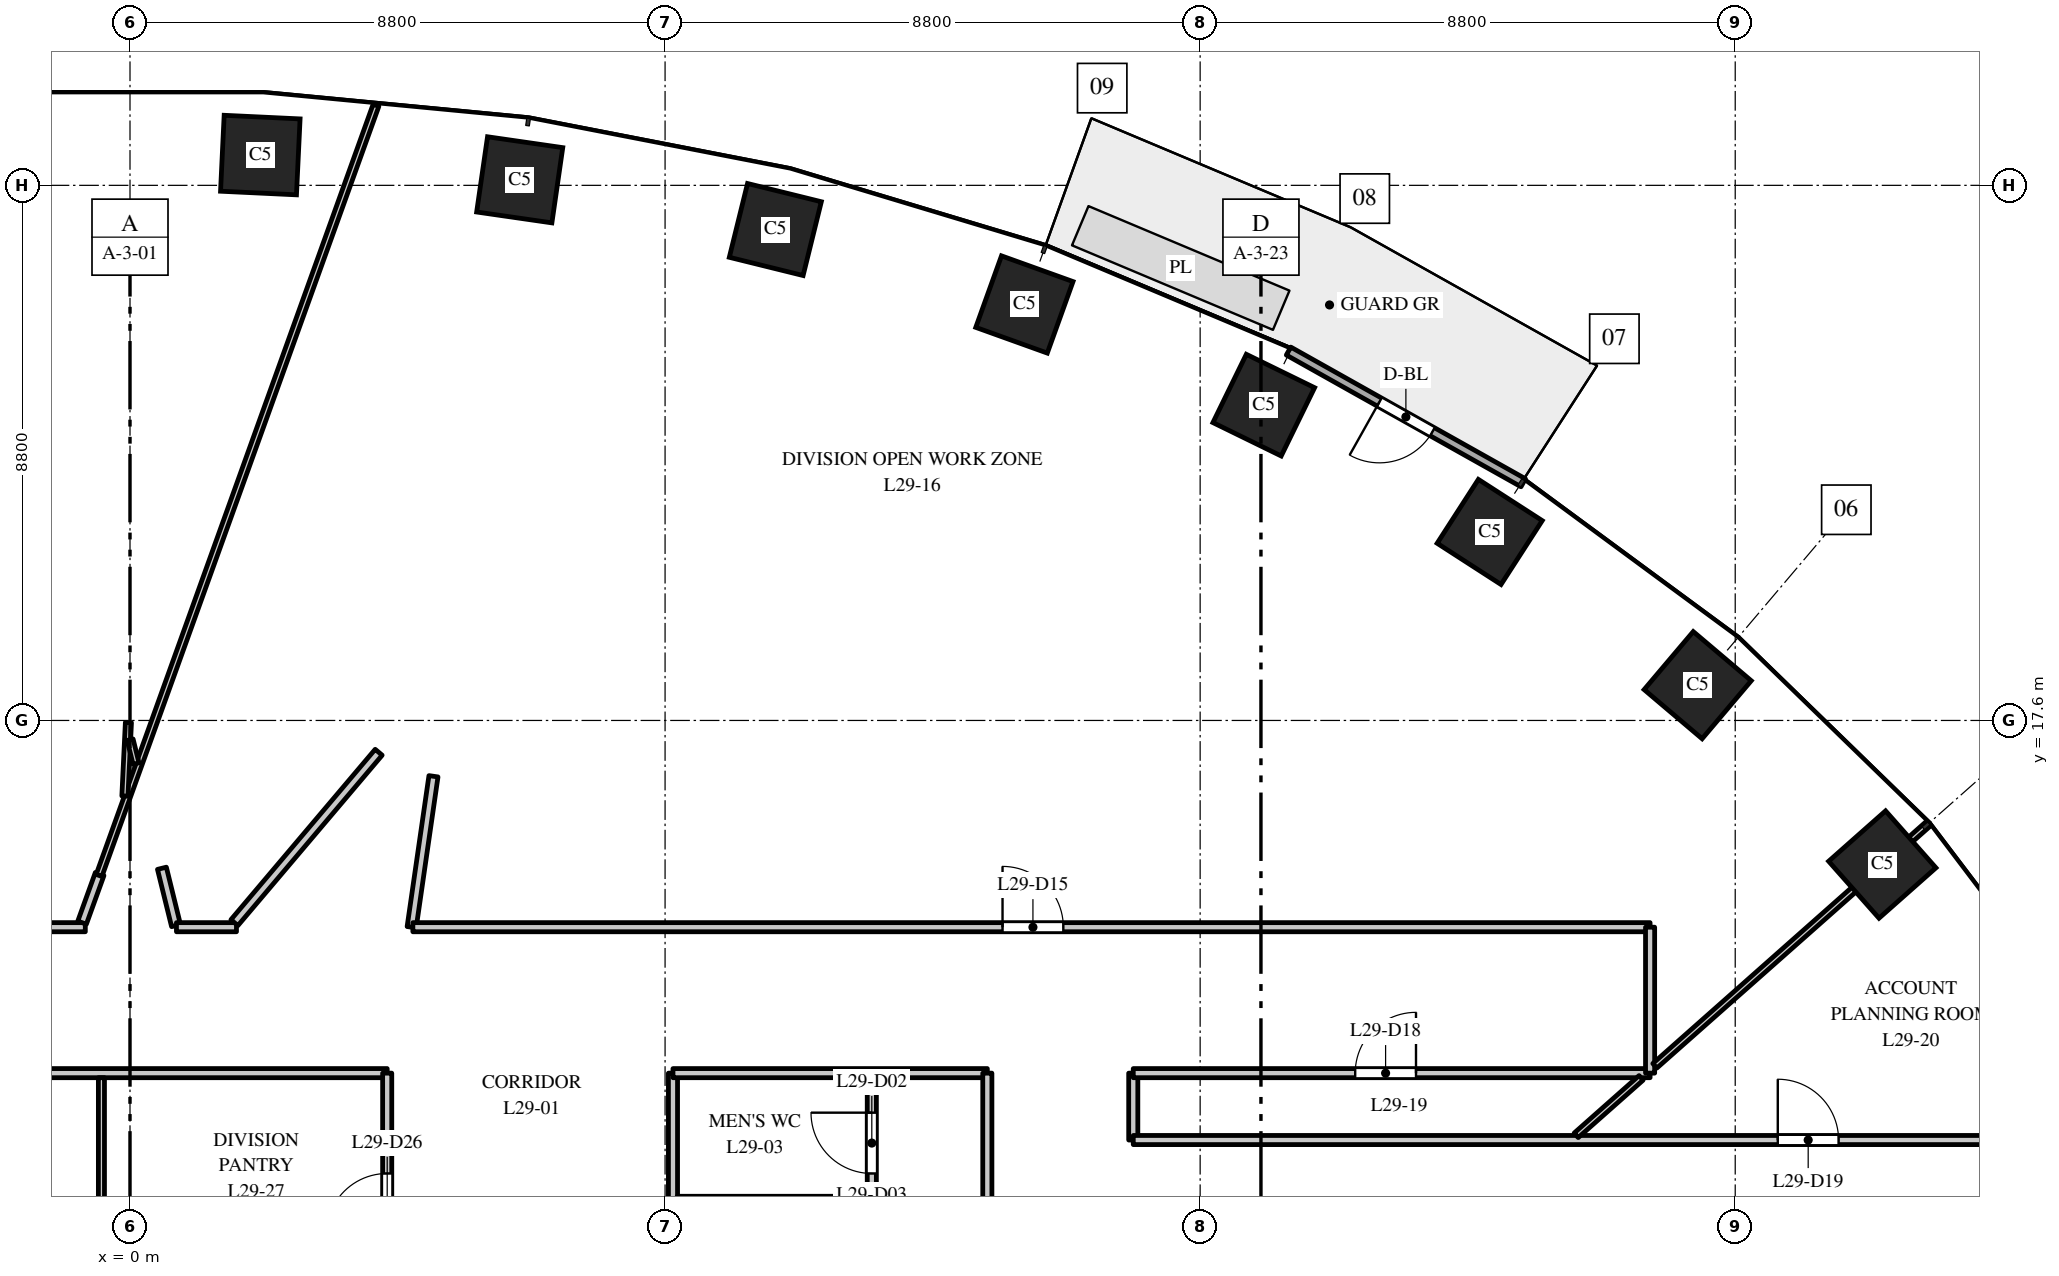
"""IFC4 building model, lengths in metres.
Left out: names, types, materials, properties, quantities, classifications, styles, units other than length and angle.
Written with IfcOpenShell. Run it as: python <this file> out.ifc"""

import sys

from ifc_helpers import new_model, si_unit, direction, frame, frame_2d, origin, origin_2d, place, context, subcontext, project, spatial, rectangle, extrude, element, fill, save


model = new_model("IFC4")
c1 = context("Model", 3, precision=1e-05, world=origin(), true_north=direction((0.0, 1.0)))
c2 = subcontext(c1, "Body", "Model", "MODEL_VIEW")
j1 = project(units=[si_unit("LENGTHUNIT", "METRE"), si_unit("PLANEANGLEUNIT", "RADIAN")], contexts=[c1])
p1 = place(None, origin())
s1 = spatial("IfcSite", under=j1, at=p1, CompositionType="ELEMENT")
p2 = place(p1, origin())
s2 = spatial("IfcBuilding", under=s1, at=p2, CompositionType="ELEMENT")
p3 = place(p2, frame((0.0, 0.0, 128.0)))
s3 = spatial("IfcBuildingStorey", under=s2, at=p3, CompositionType="ELEMENT", Elevation=128.0)
for number, where, z_axis, x_axis in (
    (1, (28.819, 15.23, 0.0), (0.0, 0.0, 1.0), (-0.663, 0.749, 0.0)),
    (2, (25.783, 18.18, 0.0), (0.0, 0.0, 1.0), (-0.763, 0.646, 0.0)),
    (3, (22.362, 20.7, 0.0), (0.0, 0.0, 1.0), (-0.84, 0.542, 0.0)),
    (4, (18.646, 22.785, 0.0), (0.0, 0.0, 1.0), (-0.898, 0.439, 0.0)),
    (5, (14.709, 24.441, 0.0), (0.0, 0.0, 1.0), (-0.941, 0.338, 0.0)),
    (6, (10.613, 25.674, 0.0), (0.0, 0.0, 1.0), (-0.971, 0.24, 0.0)),
    (7, (6.409, 26.491, 0.0), (0.0, 0.0, 1.0), (-0.99, 0.143, 0.0)),
    (8, (2.143, 26.898, 0.0), (0.0, 0.0, 1.0), (-0.999, 0.048, 0.0)),
):
    element("IfcColumn", number, at=place(p3, frame(where, z_axis=z_axis, x_axis=x_axis)), inside=s3, PredefinedType="COLUMN", context=c2, shape_type="SweptSolid", body=[
        extrude(rectangle(XDim=1.25, YDim=1.25, at=origin_2d()), origin(), (0.0, 0.0, 1.0), 4.0),
    ])
p4 = place(p3, frame((22.913, 21.509, 0.0), z_axis=(0.0, 0.0, 1.0), x_axis=(-0.872046572975, 0.489422899509, 0.0)))
e9 = element("IfcWall", 9, at=p4, inside=s3, PredefinedType="STANDARD", context=c2, shape_type="SweptSolid", body=[
    extrude(rectangle(XDim=4.426, YDim=0.15, at=frame_2d((2.213, 0.0))), origin(), (0.0, 0.0, 1.0), 3.7),
])
p5 = place(p4, frame((1.713, 0.0, 0.0)))
e10 = element("IfcOpeningElement", 10, at=p5, cuts=e9, PredefinedType="OPENING", context=c2, shape_type="SweptSolid", body=[
    extrude(rectangle(XDim=1.0, YDim=2.4, at=frame_2d((0.5, 1.2))), frame((0.0, 0.085, 0.0), z_axis=(0.0, -1.0, 0.0), x_axis=(1.0, 0.0, 0.0)), (0.0, 0.0, 1.0), 0.17),
])
p6 = place(p3, frame((-14.1, 11.8, 0.0), z_axis=(0.0, 0.0, 1.0), x_axis=(1.0, 0.0, 0.0)))
e11 = element("IfcWall", 11, at=p6, inside=s3, PredefinedType="PARTITIONING", context=c2, shape_type="SweptSolid", body=[
    extrude(rectangle(XDim=18.33, YDim=0.15, at=frame_2d((9.165, 0.0))), origin(), (0.0, 0.0, 1.0), 2.85),
])
p7 = place(p6, frame((10.83, 0.0, 0.0)))
e12 = element("IfcOpeningElement", 12, at=p7, cuts=e11, PredefinedType="OPENING", context=c2, shape_type="SweptSolid", body=[
    extrude(rectangle(XDim=1.0, YDim=2.1, at=frame_2d((0.5, 1.05))), frame((0.0, 0.085, 0.0), z_axis=(0.0, -1.0, 0.0), x_axis=(1.0, 0.0, 0.0)), (0.0, 0.0, 1.0), 0.17),
])
p8 = place(p3, frame((-4.632, 14.2, 0.0), z_axis=(0.0, 0.0, 1.0), x_axis=(1.0, 0.0, 0.0)))
e13 = element("IfcWall", 13, at=p8, inside=s3, PredefinedType="PARTITIONING", context=c2, shape_type="SweptSolid", body=[
    extrude(rectangle(XDim=3.897, YDim=0.15, at=frame_2d((1.948, 0.0))), origin(), (0.0, 0.0, 1.0), 2.85),
])
p9 = place(p8, frame((1.417, 0.0, 0.0)))
e14 = element("IfcOpeningElement", 14, at=p9, cuts=e13, PredefinedType="OPENING", context=c2, shape_type="SweptSolid", body=[
    extrude(rectangle(XDim=1.0, YDim=2.1, at=frame_2d((0.5, 1.05))), frame((0.0, 0.085, 0.0), z_axis=(0.0, -1.0, 0.0), x_axis=(1.0, 0.0, 0.0)), (0.0, 0.0, 1.0), 0.17),
])
p10 = place(p3, frame((-0.788, 14.275, 0.0), z_axis=(0.0, 0.0, 1.0), x_axis=(0.339806666964, 0.940495310508, 0.0)))
e15 = element("IfcWall", 15, at=p10, inside=s3, PredefinedType="PARTITIONING", context=c2, shape_type="SweptSolid", body=[
    extrude(rectangle(XDim=0.851, YDim=0.15, at=frame_2d((0.425, 0.0))), origin(), (0.0, 0.0, 1.0), 3.7),
])
p11 = place(p3, frame((-0.509, 15.051, 0.0), z_axis=(0.0, 0.0, 1.0), x_axis=(0.338401519309, 0.941001812819, 0.0)))
e16 = element("IfcWall", 16, at=p11, inside=s3, PredefinedType="PARTITIONING", context=c2, shape_type="SweptSolid", body=[
    extrude(rectangle(XDim=13.46, YDim=0.1, at=frame_2d((6.73, 0.0))), origin(), (0.0, 0.0, 1.0), 2.9),
])
p12 = place(p3, frame((-0.47, 7.469, 0.0), z_axis=(0.0, 0.0, 1.0), x_axis=(0.0, 1.0, 0.0)))
e17 = element("IfcWall", 17, at=p12, inside=s3, PredefinedType="PARTITIONING", context=c2, shape_type="SweptSolid", body=[
    extrude(rectangle(XDim=4.256, YDim=0.1, at=frame_2d((2.128, 0.0))), origin(), (0.0, 0.0, 1.0), 2.9),
])
p13 = place(p3, frame((-0.084, 16.356, 0.0), z_axis=(0.0, 0.0, 1.0), x_axis=(0.047967320325, 0.998848905581, 0.0)))
e18 = element("IfcWall", 18, at=p13, inside=s3, PredefinedType="PARTITIONING", context=c2, shape_type="SweptSolid", body=[
    extrude(rectangle(XDim=1.211, YDim=0.1, at=frame_2d((0.606, 0.0))), origin(), (0.0, 0.0, 1.0), 3.7),
])
p14 = place(p3, frame((0.002, 17.284, 0.0), z_axis=(0.0, 0.0, 1.0), x_axis=(0.240121592304, -0.970742819139, 0.0)))
e19 = element("IfcWall", 19, at=p14, inside=s3, PredefinedType="PARTITIONING", context=c2, shape_type="SweptSolid", body=[
    extrude(rectangle(XDim=0.405, YDim=0.1, at=frame_2d((0.202, 0.0))), origin(), (0.0, 0.0, 1.0), 3.7),
])
p15 = place(p3, frame((0.525, 15.169, 0.0), z_axis=(0.0, 0.0, 1.0), x_axis=(0.239336638609, -0.97093664748, 0.0)))
e20 = element("IfcWall", 20, at=p15, inside=s3, PredefinedType="PARTITIONING", context=c2, shape_type="SweptSolid", body=[
    extrude(rectangle(XDim=0.97, YDim=0.15, at=frame_2d((0.485, 0.0))), origin(), (0.0, 0.0, 1.0), 3.7),
])
p16 = place(p3, frame((0.764, 14.2, 0.0), z_axis=(0.0, 0.0, 1.0), x_axis=(1.0, 0.0, 0.0)))
e21 = element("IfcWall", 21, at=p16, inside=s3, PredefinedType="PARTITIONING", context=c2, shape_type="SweptSolid", body=[
    extrude(rectangle(XDim=0.987, YDim=0.15, at=frame_2d((0.494, 0.0))), origin(), (0.0, 0.0, 1.0), 3.7),
])
p17 = place(p3, frame((1.717, 14.275, 0.0), z_axis=(0.0, 0.0, 1.0), x_axis=(0.64627898285, 0.763101222857, 0.0)))
e22 = element("IfcWall", 22, at=p17, inside=s3, PredefinedType="PARTITIONING", context=c2, shape_type="SweptSolid", body=[
    extrude(rectangle(XDim=3.672, YDim=0.15, at=frame_2d((1.836, 0.0))), origin(), (0.0, 0.0, 1.0), 2.85),
])
p18 = place(p3, frame((4.23, 6.592, 0.0), z_axis=(0.0, 0.0, 1.0), x_axis=(0.0, 1.0, 0.0)))
e23 = element("IfcWall", 23, at=p18, inside=s3, PredefinedType="PARTITIONING", context=c2, shape_type="SweptSolid", body=[
    extrude(rectangle(XDim=5.208, YDim=0.15, at=frame_2d((2.604, 0.0))), origin(), (0.0, 0.0, 1.0), 2.9),
])
p19 = place(p18, frame((2.558, 0.0, 0.0)))
e24 = element("IfcOpeningElement", 24, at=p19, cuts=e23, PredefinedType="OPENING", context=c2, shape_type="SweptSolid", body=[
    extrude(rectangle(XDim=1.0, YDim=2.1, at=frame_2d((0.5, 1.05))), frame((0.0, 0.085, 0.0), z_axis=(0.0, -1.0, 0.0), x_axis=(1.0, 0.0, 0.0)), (0.0, 0.0, 1.0), 0.17),
])
p20 = place(p3, frame((4.632, 14.2, 0.0), z_axis=(0.0, 0.0, 1.0), x_axis=(0.143111225566, 0.989706611636, 0.0)))
e25 = element("IfcWall", 25, at=p20, inside=s3, PredefinedType="PARTITIONING", context=c2, shape_type="SweptSolid", body=[
    extrude(rectangle(XDim=2.508, YDim=0.15, at=frame_2d((1.254, 0.0))), origin(), (0.0, 0.0, 1.0), 3.7),
])
p21 = place(p3, frame((4.652, 14.2, 0.0), z_axis=(0.0, 0.0, 1.0), x_axis=(1.0, 0.0, 0.0)))
e26 = element("IfcWall", 26, at=p21, inside=s3, PredefinedType="PARTITIONING", context=c2, shape_type="SweptSolid", body=[
    extrude(rectangle(XDim=20.348, YDim=0.15, at=frame_2d((10.174, 0.0))), origin(), (0.0, 0.0, 1.0), 2.85),
])
p22 = place(p21, frame((9.698, 0.0, 0.0)))
e27 = element("IfcOpeningElement", 27, at=p22, cuts=e26, PredefinedType="OPENING", context=c2, shape_type="SweptSolid", body=[
    extrude(rectangle(XDim=1.0, YDim=2.1, at=frame_2d((0.5, 1.05))), frame((0.0, 0.085, 0.0), z_axis=(0.0, -1.0, 0.0), x_axis=(1.0, 0.0, 0.0)), (0.0, 0.0, 1.0), 0.17),
])
p23 = place(p3, frame((8.93, 3.879, 0.0), z_axis=(0.0, 0.0, 1.0), x_axis=(0.0, 1.0, 0.0)))
e28 = element("IfcWall", 28, at=p23, inside=s3, PredefinedType="PARTITIONING", context=c2, shape_type="SweptSolid", body=[
    extrude(rectangle(XDim=7.921, YDim=0.15, at=frame_2d((3.96, 0.0))), origin(), (0.0, 0.0, 1.0), 2.75),
])
p24 = place(p3, frame((8.93, 11.8, 0.0), z_axis=(0.0, 0.0, 1.0), x_axis=(1.0, 0.0, 0.0)))
e29 = element("IfcWall", 29, at=p24, inside=s3, PredefinedType="PARTITIONING", context=c2, shape_type="SweptSolid", body=[
    extrude(rectangle(XDim=5.17, YDim=0.15, at=frame_2d((2.585, 0.0))), origin(), (0.0, 0.0, 1.0), 3.7),
])
p25 = place(p3, frame((12.2, 5.85, 0.0), z_axis=(0.0, 0.0, 1.0), x_axis=(0.0, 1.0, 0.0)))
e30 = element("IfcWall", 30, at=p25, inside=s3, PredefinedType="PARTITIONING", context=c2, shape_type="SweptSolid", body=[
    extrude(rectangle(XDim=5.875, YDim=0.15, at=frame_2d((2.938, 0.0))), origin(), (0.0, 0.0, 1.0), 2.75),
])
p26 = place(p25, frame((4.3, 0.0, 0.0)))
e31 = element("IfcOpeningElement", 31, at=p26, cuts=e30, PredefinedType="OPENING", context=c2, shape_type="SweptSolid", body=[
    extrude(rectangle(XDim=1.0, YDim=2.1, at=frame_2d((0.5, 1.05))), frame((0.0, 0.085, 0.0), z_axis=(0.0, -1.0, 0.0), x_axis=(1.0, 0.0, 0.0)), (0.0, 0.0, 1.0), 0.17),
])
p27 = place(p25, frame((2.45, 0.0, 0.0)))
e32 = element("IfcOpeningElement", 32, at=p27, cuts=e30, PredefinedType="OPENING", context=c2, shape_type="SweptSolid", body=[
    extrude(rectangle(XDim=1.0, YDim=2.1, at=frame_2d((0.5, 1.05))), frame((0.0, 0.085, 0.0), z_axis=(0.0, -1.0, 0.0), x_axis=(1.0, 0.0, 0.0)), (0.0, 0.0, 1.0), 0.17),
])
p28 = place(p25, frame((0.49, 0.0, 0.0)))
e33 = element("IfcOpeningElement", 33, at=p28, cuts=e30, PredefinedType="OPENING", context=c2, shape_type="SweptSolid", body=[
    extrude(rectangle(XDim=1.0, YDim=2.1, at=frame_2d((0.5, 1.05))), frame((0.0, 0.085, 0.0), z_axis=(0.0, -1.0, 0.0), x_axis=(1.0, 0.0, 0.0)), (0.0, 0.0, 1.0), 0.17),
])
p29 = place(p3, frame((14.1, -11.8, 0.0), z_axis=(0.0, 0.0, 1.0), x_axis=(0.0, 1.0, 0.0)))
e34 = element("IfcWall", 34, at=p29, inside=s3, PredefinedType="PARTITIONING", context=c2, shape_type="SweptSolid", body=[
    extrude(rectangle(XDim=23.6, YDim=0.15, at=frame_2d((11.8, 0.0))), origin(), (0.0, 0.0, 1.0), 2.75),
])
p30 = place(p29, frame((11.2, 0.0, 0.0)))
e35 = element("IfcOpeningElement", 35, at=p30, cuts=e34, PredefinedType="OPENING", context=c2, shape_type="SweptSolid", body=[
    extrude(rectangle(XDim=1.0, YDim=2.1, at=frame_2d((0.5, 1.05))), frame((0.0, 0.085, 0.0), z_axis=(0.0, -1.0, 0.0), x_axis=(1.0, 0.0, 0.0)), (0.0, 0.0, 1.0), 0.17),
])
p31 = place(p3, frame((16.5, 10.7, 0.0), z_axis=(0.0, 0.0, 1.0), x_axis=(0.0, 1.0, 0.0)))
e36 = element("IfcWall", 36, at=p31, inside=s3, PredefinedType="PARTITIONING", context=c2, shape_type="SweptSolid", body=[
    extrude(rectangle(XDim=1.1, YDim=0.15, at=frame_2d((0.55, 0.0))), origin(), (0.0, 0.0, 1.0), 3.7),
])
p32 = place(p3, frame((16.5, 10.7, 0.0), z_axis=(0.0, 0.0, 1.0), x_axis=(1.0, 0.0, 0.0)))
e37 = element("IfcWall", 37, at=p32, inside=s3, PredefinedType="PARTITIONING", context=c2, shape_type="SweptSolid", body=[
    extrude(rectangle(XDim=15.0, YDim=0.15, at=frame_2d((7.5, 0.0))), origin(), (0.0, 0.0, 1.0), 2.75),
])
p33 = place(p32, frame((10.6, 0.0, 0.0)))
e38 = element("IfcOpeningElement", 38, at=p33, cuts=e37, PredefinedType="OPENING", context=c2, shape_type="SweptSolid", body=[
    extrude(rectangle(XDim=1.0, YDim=2.1, at=frame_2d((0.5, 1.05))), frame((0.0, 0.085, 0.0), z_axis=(0.0, -1.0, 0.0), x_axis=(1.0, 0.0, 0.0)), (0.0, 0.0, 1.0), 0.17),
])
p34 = place(p3, frame((16.5, 11.8, 0.0), z_axis=(0.0, 0.0, 1.0), x_axis=(1.0, 0.0, 0.0)))
e39 = element("IfcWall", 39, at=p34, inside=s3, PredefinedType="PARTITIONING", context=c2, shape_type="SweptSolid", body=[
    extrude(rectangle(XDim=8.5, YDim=0.15, at=frame_2d((4.25, 0.0))), origin(), (0.0, 0.0, 1.0), 2.75),
])
p35 = place(p34, frame((3.65, 0.0, 0.0)))
e40 = element("IfcOpeningElement", 40, at=p35, cuts=e39, PredefinedType="OPENING", context=c2, shape_type="SweptSolid", body=[
    extrude(rectangle(XDim=1.0, YDim=2.1, at=frame_2d((0.5, 1.05))), frame((0.0, 0.085, 0.0), z_axis=(0.0, -1.0, 0.0), x_axis=(1.0, 0.0, 0.0)), (0.0, 0.0, 1.0), 0.17),
])
p36 = place(p3, frame((23.785, 10.778, 0.0), z_axis=(0.0, 0.0, 1.0), x_axis=(0.749052165765, 0.662511021013, 0.0)))
e41 = element("IfcWall", 41, at=p36, inside=s3, PredefinedType="PARTITIONING", context=c2, shape_type="SweptSolid", body=[
    extrude(rectangle(XDim=1.425, YDim=0.1, at=frame_2d((0.712, 0.0))), origin(), (0.0, 0.0, 1.0), 3.7),
])
p37 = place(p3, frame((25.0, 11.8, 0.0), z_axis=(0.0, 0.0, 1.0), x_axis=(0.0, 1.0, 0.0)))
e42 = element("IfcWall", 42, at=p37, inside=s3, PredefinedType="PARTITIONING", context=c2, shape_type="SweptSolid", body=[
    extrude(rectangle(XDim=2.4, YDim=0.15, at=frame_2d((1.2, 0.0))), origin(), (0.0, 0.0, 1.0), 2.75),
])
p38 = place(p3, frame((25.078, 11.921, 0.0), z_axis=(0.0, 0.0, 1.0), x_axis=(0.748903310324, 0.662679282749, 0.0)))
e43 = element("IfcWall", 43, at=p38, inside=s3, PredefinedType="PARTITIONING", context=c2, shape_type="SweptSolid", body=[
    extrude(rectangle(XDim=5.997, YDim=0.1, at=frame_2d((2.999, 0.0))), origin(), (0.0, 0.0, 1.0), 3.7),
])
p39 = place(p5, origin())
e44 = element("IfcDoor", 44, at=p39, inside=s3, OperationType="SINGLE_SWING_RIGHT", PredefinedType="DOOR", context=c2, shape_type="SweptSolid", body=[
    extrude(rectangle(XDim=1.0, YDim=2.4, at=frame_2d((0.5, 1.2))), frame((0.0, 0.025, 0.0), z_axis=(0.0, -1.0, 0.0), x_axis=(1.0, 0.0, 0.0)), (0.0, 0.0, 1.0), 0.05),
])
fill(e10, e44)
p40 = place(p26, origin())
e45 = element("IfcDoor", 45, at=p40, inside=s3, OperationType="SINGLE_SWING_RIGHT", PredefinedType="DOOR", context=c2, shape_type="SweptSolid", body=[
    extrude(rectangle(XDim=1.0, YDim=2.1, at=frame_2d((0.5, 1.05))), frame((0.0, 0.025, 0.0), z_axis=(0.0, -1.0, 0.0), x_axis=(1.0, 0.0, 0.0)), (0.0, 0.0, 1.0), 0.05),
])
fill(e31, e45)
p41 = place(p22, origin())
e46 = element("IfcDoor", 46, at=p41, inside=s3, OperationType="SINGLE_SWING_LEFT", PredefinedType="DOOR", context=c2, shape_type="SweptSolid", body=[
    extrude(rectangle(XDim=1.0, YDim=2.1, at=frame_2d((0.5, 1.05))), frame((0.0, 0.025, 0.0), z_axis=(0.0, -1.0, 0.0), x_axis=(1.0, 0.0, 0.0)), (0.0, 0.0, 1.0), 0.05),
])
fill(e27, e46)
p42 = place(p35, origin())
e47 = element("IfcDoor", 47, at=p42, inside=s3, OperationType="SINGLE_SWING_RIGHT", PredefinedType="DOOR", context=c2, shape_type="SweptSolid", body=[
    extrude(rectangle(XDim=1.0, YDim=2.1, at=frame_2d((0.5, 1.05))), frame((0.0, 0.025, 0.0), z_axis=(0.0, -1.0, 0.0), x_axis=(1.0, 0.0, 0.0)), (0.0, 0.0, 1.0), 0.05),
])
fill(e40, e47)
p43 = place(p33, origin())
e48 = element("IfcDoor", 48, at=p43, inside=s3, OperationType="SINGLE_SWING_LEFT", PredefinedType="DOOR", context=c2, shape_type="SweptSolid", body=[
    extrude(rectangle(XDim=1.0, YDim=2.1, at=frame_2d((0.5, 1.05))), frame((0.0, 0.025, 0.0), z_axis=(0.0, -1.0, 0.0), x_axis=(1.0, 0.0, 0.0)), (0.0, 0.0, 1.0), 0.05),
])
fill(e38, e48)
p44 = place(p19, origin())
e49 = element("IfcDoor", 49, at=p44, inside=s3, OperationType="SINGLE_SWING_LEFT", PredefinedType="DOOR", context=c2, shape_type="SweptSolid", body=[
    extrude(rectangle(XDim=1.0, YDim=2.1, at=frame_2d((0.5, 1.05))), frame((0.0, 0.025, 0.0), z_axis=(0.0, -1.0, 0.0), x_axis=(1.0, 0.0, 0.0)), (0.0, 0.0, 1.0), 0.05),
])
fill(e24, e49)
save(model, sys.argv[1])
